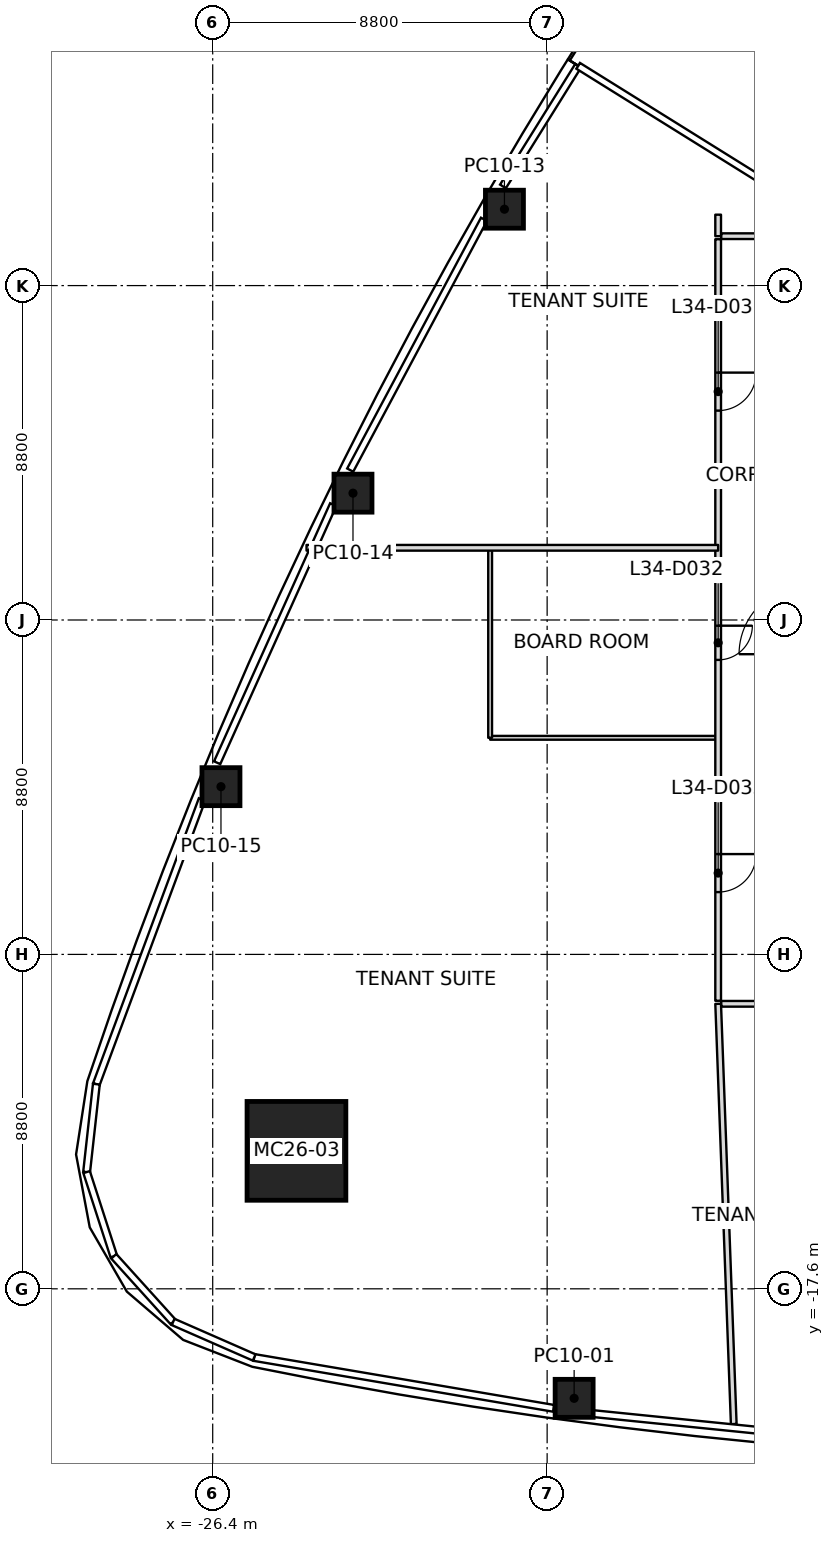
"""IFC4 building model, lengths in metres.
Left out: names, types, materials, properties, quantities, classifications, styles, units other than length and angle.
Written with IfcOpenShell. Run it as: python <this file> out.ifc"""

import sys

from ifc_helpers import new_model, si_unit, direction, frame, frame_2d, origin, origin_2d, place, context, subcontext, project, spatial, rectangle, extrude, element, fill, save


model = new_model("IFC4")
c1 = context("Model", 3, precision=1e-05, world=origin(), true_north=direction((0.0, 1.0)))
c2 = subcontext(c1, "Body", "Model", "MODEL_VIEW")
j1 = project(units=[si_unit("LENGTHUNIT", "METRE"), si_unit("PLANEANGLEUNIT", "RADIAN")], contexts=[c1])
p1 = place(None, origin())
s1 = spatial("IfcSite", under=j1, at=p1, CompositionType="ELEMENT")
p2 = place(p1, origin())
s2 = spatial("IfcBuilding", under=s1, at=p2, CompositionType="ELEMENT")
p3 = place(p2, frame((0.0, 0.0, 157.8)))
s3 = spatial("IfcBuildingStorey", under=s2, at=p3, CompositionType="ELEMENT", Elevation=157.8)
p4 = place(p3, frame((-24.196, -13.969, 0.0), z_axis=(0.028061445165, 0.016165832541, 0.999475473012), x_axis=(0.999606200108, -0.000453815336, -0.028057775329)))
e1 = element("IfcColumn", 1, at=p4, inside=s3, PredefinedType="COLUMN", context=c2, shape_type="SweptSolid", body=[
    extrude(rectangle(XDim=2.6, YDim=2.6, at=origin_2d()), origin(), (0.0, 0.0, 1.0), 4.002),
])
p5 = place(p3, frame((-16.889, -20.482, 0.0), z_axis=(0.017635445209, 0.010495835903, 0.999789392073), x_axis=(-0.990805220728, 0.134338663176, 0.016066678389)))
e2 = element("IfcColumn", 2, at=p5, inside=s3, PredefinedType="COLUMN", context=c2, shape_type="SweptSolid", body=[
    extrude(rectangle(XDim=1.0, YDim=1.0, at=origin_2d()), origin(), (0.0, 0.0, 1.0), 4.001),
])
p6 = place(p3, frame((-18.723, 10.81, 0.0), z_axis=(0.009887049298, -0.00573692984, 0.999934664812), x_axis=(0.499975560967, 0.866039512843, 2.5126546e-05)))
e3 = element("IfcColumn", 3, at=p6, inside=s3, PredefinedType="COLUMN", context=c2, shape_type="SweptSolid", body=[
    extrude(rectangle(XDim=1.0, YDim=1.0, at=origin_2d()), origin(), (0.0, 0.0, 1.0), 4.0),
])
p7 = place(p3, frame((-22.709, 3.338, 0.0), z_axis=(0.014097689605, 0.002074984617, 0.999898469639), x_axis=(0.440598986635, 0.897667716395, -0.008074894304)))
e4 = element("IfcColumn", 4, at=p7, inside=s3, PredefinedType="COLUMN", context=c2, shape_type="SweptSolid", body=[
    extrude(rectangle(XDim=1.0, YDim=1.0, at=origin_2d()), origin(), (0.0, 0.0, 1.0), 4.0),
])
p8 = place(p3, frame((-26.183, -4.386, 0.0), z_axis=(0.017879535448, 0.010068680372, 0.999789449778), x_axis=(0.379230813996, 0.925162045929, -0.016099021367)))
e5 = element("IfcColumn", 5, at=p8, inside=s3, PredefinedType="COLUMN", context=c2, shape_type="SweptSolid", body=[
    extrude(rectangle(XDim=1.0, YDim=1.0, at=origin_2d()), origin(), (0.0, 0.0, 1.0), 4.001),
])
p9 = place(p3, frame((-13.1, 1.9, 0.0), z_axis=(0.0, 0.0, 1.0), x_axis=(-1.0, 0.0, 0.0)))
e6 = element("IfcWall", 6, at=p9, inside=s3, PredefinedType="PARTITIONING", context=c2, shape_type="SweptSolid", body=[
    extrude(rectangle(XDim=10.831, YDim=0.15, at=frame_2d((5.416, 0.0))), origin(), (0.0, 0.0, 1.0), 3.234),
])
p10 = place(p3, frame((-13.1, -10.1, 0.0), z_axis=(0.0, 0.0, 1.0), x_axis=(0.037085915045, -0.999312080836, 0.0)))
e7 = element("IfcWall", 7, at=p10, inside=s3, PredefinedType="PARTITIONING", context=c2, shape_type="SweptSolid", body=[
    extrude(rectangle(XDim=11.066, YDim=0.15, at=frame_2d((5.533, 0.0))), origin(), (0.0, 0.0, 1.0), 3.234),
])
p11 = place(p3, frame((-13.1, 10.1, 0.0), z_axis=(0.0, 0.0, 1.0), x_axis=(0.0, 1.0, 0.0)))
e8 = element("IfcWall", 8, at=p11, inside=s3, PredefinedType="PARTITIONING", context=c2, shape_type="SweptSolid", body=[
    extrude(rectangle(XDim=0.566, YDim=0.15, at=frame_2d((0.283, 0.0))), origin(), (0.0, 0.0, 1.0), 3.45),
])
p12 = place(p3, frame((-13.1, 10.02, 0.0), z_axis=(0.0, 0.0, 1.0), x_axis=(0.0, -1.0, 0.0)))
e9 = element("IfcWall", 9, at=p12, inside=s3, PredefinedType="PARTITIONING", context=c2, shape_type="SweptSolid", body=[
    extrude(rectangle(XDim=20.04, YDim=0.15, at=frame_2d((10.02, 0.0))), origin(), (0.0, 0.0, 1.0), 3.166),
])
p13 = place(p12, frame((3.51, 0.0, 0.0)))
e10 = element("IfcOpeningElement", 10, at=p13, cuts=e9, PredefinedType="OPENING", context=c2, shape_type="SweptSolid", body=[
    extrude(rectangle(XDim=1.0, YDim=2.1, at=frame_2d((0.5, 1.05))), frame((0.0, 0.075, 0.0), z_axis=(0.0, -1.0, 0.0), x_axis=(1.0, 0.0, 0.0)), (0.0, 0.0, 1.0), 0.15),
])
p14 = place(p12, frame((10.17, 0.0, 0.0)))
e11 = element("IfcOpeningElement", 11, at=p14, cuts=e9, PredefinedType="OPENING", context=c2, shape_type="SweptSolid", body=[
    extrude(rectangle(XDim=0.9, YDim=2.1, at=frame_2d((0.45, 1.05))), frame((0.0, 0.075, 0.0), z_axis=(0.0, -1.0, 0.0), x_axis=(1.0, 0.0, 0.0)), (0.0, 0.0, 1.0), 0.15),
])
p15 = place(p12, frame((16.18, 0.0, 0.0)))
e12 = element("IfcOpeningElement", 12, at=p15, cuts=e9, PredefinedType="OPENING", context=c2, shape_type="SweptSolid", body=[
    extrude(rectangle(XDim=1.0, YDim=2.1, at=frame_2d((0.5, 1.05))), frame((0.0, 0.075, 0.0), z_axis=(0.0, -1.0, 0.0), x_axis=(1.0, 0.0, 0.0)), (0.0, 0.0, 1.0), 0.15),
])
p16 = place(p3, frame((-13.02, -10.1, 0.0), z_axis=(0.0, 0.0, 1.0), x_axis=(1.0, 0.0, 0.0)))
e13 = element("IfcWall", 13, at=p16, inside=s3, PredefinedType="PARTITIONING", context=c2, shape_type="SweptSolid", body=[
    extrude(rectangle(XDim=26.12, YDim=0.15, at=frame_2d((13.06, 0.0))), origin(), (0.0, 0.0, 1.0), 3.317),
])
p17 = place(p16, frame((2.02, 0.0, 0.0)))
e14 = element("IfcOpeningElement", 14, at=p17, cuts=e13, PredefinedType="OPENING", context=c2, shape_type="SweptSolid", body=[
    extrude(rectangle(XDim=1.0, YDim=2.1, at=frame_2d((0.5, 1.05))), frame((0.0, 0.075, 0.0), z_axis=(0.0, -1.0, 0.0), x_axis=(1.0, 0.0, 0.0)), (0.0, 0.0, 1.0), 0.15),
])
p18 = place(p16, frame((6.47, 0.0, 0.0)))
e15 = element("IfcOpeningElement", 15, at=p18, cuts=e13, PredefinedType="OPENING", context=c2, shape_type="SweptSolid", body=[
    extrude(rectangle(XDim=0.9, YDim=2.1, at=frame_2d((0.45, 1.05))), frame((0.0, 0.075, 0.0), z_axis=(0.0, -1.0, 0.0), x_axis=(1.0, 0.0, 0.0)), (0.0, 0.0, 1.0), 0.15),
])
p19 = place(p16, frame((12.47, 0.0, 0.0)))
e16 = element("IfcOpeningElement", 16, at=p19, cuts=e13, PredefinedType="OPENING", context=c2, shape_type="SweptSolid", body=[
    extrude(rectangle(XDim=1.0, YDim=2.1, at=frame_2d((0.5, 1.05))), frame((0.0, 0.075, 0.0), z_axis=(0.0, -1.0, 0.0), x_axis=(1.0, 0.0, 0.0)), (0.0, 0.0, 1.0), 0.15),
])
p20 = place(p16, frame((18.77, 0.0, 0.0)))
e17 = element("IfcOpeningElement", 17, at=p20, cuts=e13, PredefinedType="OPENING", context=c2, shape_type="SweptSolid", body=[
    extrude(rectangle(XDim=0.9, YDim=2.1, at=frame_2d((0.45, 1.05))), frame((0.0, 0.075, 0.0), z_axis=(0.0, -1.0, 0.0), x_axis=(1.0, 0.0, 0.0)), (0.0, 0.0, 1.0), 0.15),
])
p21 = place(p16, frame((23.27, 0.0, 0.0)))
e18 = element("IfcOpeningElement", 18, at=p21, cuts=e13, PredefinedType="OPENING", context=c2, shape_type="SweptSolid", body=[
    extrude(rectangle(XDim=1.0, YDim=2.1, at=frame_2d((0.5, 1.05))), frame((0.0, 0.075, 0.0), z_axis=(0.0, -1.0, 0.0), x_axis=(1.0, 0.0, 0.0)), (0.0, 0.0, 1.0), 0.15),
])
p22 = place(p3, frame((12.484, 10.1, 0.0), z_axis=(0.0, 0.0, 1.0), x_axis=(-1.0, 0.0, 0.0)))
e19 = element("IfcWall", 19, at=p22, inside=s3, PredefinedType="PARTITIONING", context=c2, shape_type="SweptSolid", body=[
    extrude(rectangle(XDim=25.504, YDim=0.15, at=frame_2d((12.752, 0.0))), origin(), (0.0, 0.0, 1.0), 3.166),
])
p23 = place(p22, frame((14.634, 0.0, 0.0)))
e20 = element("IfcOpeningElement", 20, at=p23, cuts=e19, PredefinedType="OPENING", context=c2, shape_type="SweptSolid", body=[
    extrude(rectangle(XDim=0.9, YDim=2.1, at=frame_2d((0.45, 1.05))), frame((0.0, 0.075, 0.0), z_axis=(0.0, -1.0, 0.0), x_axis=(1.0, 0.0, 0.0)), (0.0, 0.0, 1.0), 0.15),
])
p24 = place(p22, frame((6.196, 0.0, 0.0)))
e21 = element("IfcOpeningElement", 21, at=p24, cuts=e19, PredefinedType="OPENING", context=c2, shape_type="SweptSolid", body=[
    extrude(rectangle(XDim=1.0, YDim=2.1, at=frame_2d((0.5, 1.05))), frame((0.0, 0.075, 0.0), z_axis=(0.0, -1.0, 0.0), x_axis=(1.0, 0.0, 0.0)), (0.0, 0.0, 1.0), 0.15),
])
p25 = place(p22, frame((20.584, 0.0, 0.0)))
e22 = element("IfcOpeningElement", 22, at=p25, cuts=e19, PredefinedType="OPENING", context=c2, shape_type="SweptSolid", body=[
    extrude(rectangle(XDim=1.0, YDim=2.1, at=frame_2d((0.5, 1.05))), frame((0.0, 0.075, 0.0), z_axis=(0.0, -1.0, 0.0), x_axis=(1.0, 0.0, 0.0)), (0.0, 0.0, 1.0), 0.15),
])
p26 = place(p3, frame((-13.13, -3.1, 0.0), z_axis=(0.0, 0.0, 1.0), x_axis=(-1.0, 0.0, 0.0)))
e23 = element("IfcWall", 23, at=p26, inside=s3, PredefinedType="PARTITIONING", context=c2, shape_type="SweptSolid", body=[
    extrude(rectangle(XDim=5.97, YDim=0.1, at=frame_2d((2.985, 0.0))), origin(), (0.0, 0.0, 1.0), 3.317),
])
p27 = place(p3, frame((-19.1, -3.1, 0.0), z_axis=(0.0, 0.0, 1.0), x_axis=(0.0, 1.0, 0.0)))
e24 = element("IfcWall", 24, at=p27, inside=s3, PredefinedType="PARTITIONING", context=c2, shape_type="SweptSolid", body=[
    extrude(rectangle(XDim=4.97, YDim=0.1, at=frame_2d((2.485, 0.0))), origin(), (0.0, 0.0, 1.0), 3.317),
])
p28 = place(p13, origin())
e25 = element("IfcDoor", 25, at=p28, inside=s3, OperationType="SINGLE_SWING_LEFT", PredefinedType="DOOR", context=c2, shape_type="SweptSolid", body=[
    extrude(rectangle(XDim=1.0, YDim=2.1, at=frame_2d((0.5, 1.05))), frame((0.0, 0.025, 0.0), z_axis=(0.0, -1.0, 0.0), x_axis=(1.0, 0.0, 0.0)), (0.0, 0.0, 1.0), 0.05),
])
fill(e10, e25)
p29 = place(p14, origin())
e26 = element("IfcDoor", 26, at=p29, inside=s3, OperationType="SINGLE_SWING_LEFT", PredefinedType="DOOR", context=c2, shape_type="SweptSolid", body=[
    extrude(rectangle(XDim=0.9, YDim=2.1, at=frame_2d((0.45, 1.05))), frame((0.0, 0.025, 0.0), z_axis=(0.0, -1.0, 0.0), x_axis=(1.0, 0.0, 0.0)), (0.0, 0.0, 1.0), 0.05),
])
fill(e11, e26)
p30 = place(p15, origin())
e27 = element("IfcDoor", 27, at=p30, inside=s3, OperationType="SINGLE_SWING_LEFT", PredefinedType="DOOR", context=c2, shape_type="SweptSolid", body=[
    extrude(rectangle(XDim=1.0, YDim=2.1, at=frame_2d((0.5, 1.05))), frame((0.0, 0.025, 0.0), z_axis=(0.0, -1.0, 0.0), x_axis=(1.0, 0.0, 0.0)), (0.0, 0.0, 1.0), 0.05),
])
fill(e12, e27)
save(model, sys.argv[1])
